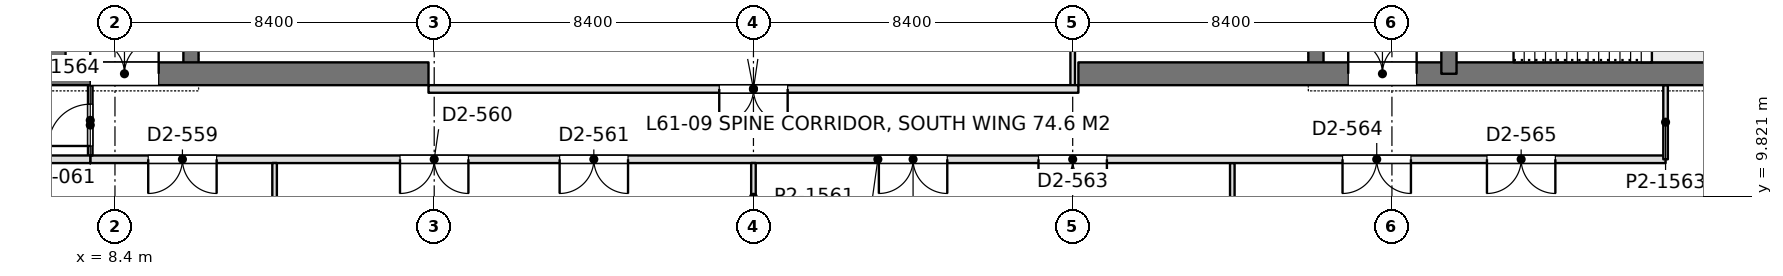
"""IFC4 building model, lengths in metres.
Left out: names, types, materials, properties, quantities, classifications, styles, units other than length and angle.
Written with IfcOpenShell. Run it as: python <this file> out.ifc"""

import sys

from ifc_helpers import new_model, si_unit, direction, frame, frame_2d, origin, place, context, subcontext, project, spatial, rectangle, extrude, element, fill, save


model = new_model("IFC4")
c1 = context("Model", 3, precision=1e-05, world=origin(), true_north=direction((0.0, 1.0)))
c2 = subcontext(c1, "Body", "Model", "MODEL_VIEW")
j1 = project(units=[si_unit("LENGTHUNIT", "METRE"), si_unit("PLANEANGLEUNIT", "RADIAN")], contexts=[c1])
p1 = place(None, origin())
s1 = spatial("IfcSite", under=j1, at=p1, CompositionType="ELEMENT")
p2 = place(p1, origin())
s2 = spatial("IfcBuilding", under=s1, at=p2, CompositionType="ELEMENT")
p3 = place(p2, frame((0.0, 0.0, 268.2)))
s3 = spatial("IfcBuildingStorey", under=s2, at=p3, CompositionType="ELEMENT", Elevation=268.2)
p4 = place(p3, frame((-1.05, 13.05, 0.0), z_axis=(0.0, 0.0, 1.0), x_axis=(1.0, 0.0, 0.0)))
e1 = element("IfcWall", 1, at=p4, inside=s3, PredefinedType="SHEAR", context=c2, shape_type="SweptSolid", body=[
    extrude(rectangle(XDim=17.7, YDim=0.6, at=frame_2d((8.85, 0.0))), origin(), (0.0, 0.0, 1.0), 4.5),
])
p5 = place(p4, frame((8.8, 0.0, 0.0)))
e2 = element("IfcOpeningElement", 2, at=p5, cuts=e1, PredefinedType="OPENING", context=c2, shape_type="SweptSolid", body=[
    extrude(rectangle(XDim=1.8, YDim=2.4, at=frame_2d((0.9, 1.2))), frame((0.0, 0.31, 0.0), z_axis=(0.0, -1.0, 0.0), x_axis=(1.0, 0.0, 0.0)), (0.0, 0.0, 1.0), 0.62),
])
p6 = place(p3, frame((6.9, 13.05, 0.0), z_axis=(0.0, 0.0, 1.0), x_axis=(0.0, 1.0, 0.0)))
e3 = element("IfcWall", 3, at=p6, inside=s3, PredefinedType="SHEAR", context=c2, shape_type="SweptSolid", body=[
    extrude(rectangle(XDim=24.3, YDim=0.4, at=frame_2d((12.15, 0.0))), origin(), (0.0, 0.0, 1.0), 4.5),
])
p7 = place(p6, frame((1.3, 0.0, 0.0)))
e4 = element("IfcOpeningElement", 4, at=p7, cuts=e3, PredefinedType="OPENING", context=c2, shape_type="SweptSolid", body=[
    extrude(rectangle(XDim=1.0, YDim=2.2, at=frame_2d((0.5, 1.1))), frame((0.0, 0.21, 0.0), z_axis=(0.0, -1.0, 0.0), x_axis=(1.0, 0.0, 0.0)), (0.0, 0.0, 1.0), 0.42),
])
p8 = place(p6, frame((22.0, 0.0, 0.0)))
e5 = element("IfcOpeningElement", 5, at=p8, cuts=e3, PredefinedType="OPENING", context=c2, shape_type="SweptSolid", body=[
    extrude(rectangle(XDim=1.0, YDim=2.2, at=frame_2d((0.5, 1.1))), frame((0.0, 0.21, 0.0), z_axis=(0.0, -1.0, 0.0), x_axis=(1.0, 0.0, 0.0)), (0.0, 0.0, 1.0), 0.42),
])
p9 = place(p6, frame((5.55, 0.0, 0.0)))
e6 = element("IfcOpeningElement", 6, at=p9, cuts=e3, PredefinedType="OPENING", context=c2, shape_type="SweptSolid", body=[
    extrude(rectangle(XDim=1.0, YDim=2.2, at=frame_2d((0.5, 1.1))), frame((0.0, 0.21, 0.0), z_axis=(0.0, -1.0, 0.0), x_axis=(1.0, 0.0, 0.0)), (0.0, 0.0, 1.0), 0.42),
])
p10 = place(p6, frame((9.55, 0.0, 0.0)))
e7 = element("IfcOpeningElement", 7, at=p10, cuts=e3, PredefinedType="OPENING", context=c2, shape_type="SweptSolid", body=[
    extrude(rectangle(XDim=1.0, YDim=2.2, at=frame_2d((0.5, 1.1))), frame((0.0, 0.21, 0.0), z_axis=(0.0, -1.0, 0.0), x_axis=(1.0, 0.0, 0.0)), (0.0, 0.0, 1.0), 0.42),
])
p11 = place(p6, frame((12.8, 0.0, 0.0)))
e8 = element("IfcOpeningElement", 8, at=p11, cuts=e3, PredefinedType="OPENING", context=c2, shape_type="SweptSolid", body=[
    extrude(rectangle(XDim=1.1, YDim=2.2, at=frame_2d((0.55, 1.1))), frame((0.0, 0.21, 0.0), z_axis=(0.0, -1.0, 0.0), x_axis=(1.0, 0.0, 0.0)), (0.0, 0.0, 1.0), 0.42),
])
p12 = place(p6, frame((15.538, 0.0, 0.0)))
e9 = element("IfcOpeningElement", 9, at=p12, cuts=e3, PredefinedType="OPENING", context=c2, shape_type="SweptSolid", body=[
    extrude(rectangle(XDim=1.1, YDim=2.2, at=frame_2d((0.55, 1.1))), frame((0.0, 0.21, 0.0), z_axis=(0.0, -1.0, 0.0), x_axis=(1.0, 0.0, 0.0)), (0.0, 0.0, 1.0), 0.42),
])
p13 = place(p6, frame((18.262, 0.0, 0.0)))
e10 = element("IfcOpeningElement", 10, at=p13, cuts=e3, PredefinedType="OPENING", context=c2, shape_type="SweptSolid", body=[
    extrude(rectangle(XDim=1.1, YDim=2.2, at=frame_2d((0.55, 1.1))), frame((0.0, 0.21, 0.0), z_axis=(0.0, -1.0, 0.0), x_axis=(1.0, 0.0, 0.0)), (0.0, 0.0, 1.0), 0.42),
])
p14 = place(p3, frame((10.4, 13.05, 0.0), z_axis=(0.0, 0.0, 1.0), x_axis=(0.0, 1.0, 0.0)))
e11 = element("IfcWall", 11, at=p14, inside=s3, PredefinedType="SHEAR", context=c2, shape_type="SweptSolid", body=[
    extrude(rectangle(XDim=24.3, YDim=0.4, at=frame_2d((12.15, 0.0))), origin(), (0.0, 0.0, 1.0), 4.5),
])
p15 = place(p14, frame((15.75, 0.0, 0.0)))
e12 = element("IfcOpeningElement", 12, at=p15, cuts=e11, PredefinedType="OPENING", context=c2, shape_type="SweptSolid", body=[
    extrude(rectangle(XDim=1.1, YDim=2.2, at=frame_2d((0.55, 1.1))), frame((0.0, 0.21, 0.0), z_axis=(0.0, -1.0, 0.0), x_axis=(1.0, 0.0, 0.0)), (0.0, 0.0, 1.0), 0.42),
])
p16 = place(p14, frame((18.6, 0.0, 0.0)))
e13 = element("IfcOpeningElement", 13, at=p16, cuts=e11, PredefinedType="OPENING", context=c2, shape_type="SweptSolid", body=[
    extrude(rectangle(XDim=1.1, YDim=2.2, at=frame_2d((0.55, 1.1))), frame((0.0, 0.21, 0.0), z_axis=(0.0, -1.0, 0.0), x_axis=(1.0, 0.0, 0.0)), (0.0, 0.0, 1.0), 0.42),
])
p17 = place(p14, frame((21.45, 0.0, 0.0)))
e14 = element("IfcOpeningElement", 14, at=p17, cuts=e11, PredefinedType="OPENING", context=c2, shape_type="SweptSolid", body=[
    extrude(rectangle(XDim=1.1, YDim=2.2, at=frame_2d((0.55, 1.1))), frame((0.0, 0.21, 0.0), z_axis=(0.0, -1.0, 0.0), x_axis=(1.0, 0.0, 0.0)), (0.0, 0.0, 1.0), 0.42),
])
p18 = place(p14, frame((8.65, 0.0, 0.0)))
e15 = element("IfcOpeningElement", 15, at=p18, cuts=e11, PredefinedType="OPENING", context=c2, shape_type="SweptSolid", body=[
    extrude(rectangle(XDim=1.8, YDim=2.4, at=frame_2d((0.9, 1.2))), frame((0.0, 0.21, 0.0), z_axis=(0.0, -1.0, 0.0), x_axis=(1.0, 0.0, 0.0)), (0.0, 0.0, 1.0), 0.42),
])
p19 = place(p3, frame((33.75, 13.05, 0.0), z_axis=(0.0, 0.0, 1.0), x_axis=(1.0, 0.0, 0.0)))
e16 = element("IfcWall", 16, at=p19, inside=s3, PredefinedType="SHEAR", context=c2, shape_type="SweptSolid", body=[
    extrude(rectangle(XDim=17.7, YDim=0.6, at=frame_2d((8.85, 0.0))), origin(), (0.0, 0.0, 1.0), 4.5),
])
p20 = place(p19, frame((7.1, 0.0, 0.0)))
e17 = element("IfcOpeningElement", 17, at=p20, cuts=e16, PredefinedType="OPENING", context=c2, shape_type="SweptSolid", body=[
    extrude(rectangle(XDim=1.8, YDim=2.4, at=frame_2d((0.9, 1.2))), frame((0.0, 0.31, 0.0), z_axis=(0.0, -1.0, 0.0), x_axis=(1.0, 0.0, 0.0)), (0.0, 0.0, 1.0), 0.62),
])
p21 = place(p3, frame((43.5, 13.05, 0.0), z_axis=(0.0, 0.0, 1.0), x_axis=(0.0, 1.0, 0.0)))
e18 = element("IfcWall", 18, at=p21, inside=s3, PredefinedType="SHEAR", context=c2, shape_type="SweptSolid", body=[
    extrude(rectangle(XDim=24.3, YDim=0.4, at=frame_2d((12.15, 0.0))), origin(), (0.0, 0.0, 1.0), 4.5),
])
p22 = place(p21, frame((1.3, 0.0, 0.0)))
e19 = element("IfcOpeningElement", 19, at=p22, cuts=e18, PredefinedType="OPENING", context=c2, shape_type="SweptSolid", body=[
    extrude(rectangle(XDim=1.0, YDim=2.2, at=frame_2d((0.5, 1.1))), frame((0.0, 0.21, 0.0), z_axis=(0.0, -1.0, 0.0), x_axis=(1.0, 0.0, 0.0)), (0.0, 0.0, 1.0), 0.42),
])
p23 = place(p21, frame((22.0, 0.0, 0.0)))
e20 = element("IfcOpeningElement", 20, at=p23, cuts=e18, PredefinedType="OPENING", context=c2, shape_type="SweptSolid", body=[
    extrude(rectangle(XDim=1.0, YDim=2.2, at=frame_2d((0.5, 1.1))), frame((0.0, 0.21, 0.0), z_axis=(0.0, -1.0, 0.0), x_axis=(1.0, 0.0, 0.0)), (0.0, 0.0, 1.0), 0.42),
])
p24 = place(p21, frame((5.55, 0.0, 0.0)))
e21 = element("IfcOpeningElement", 21, at=p24, cuts=e18, PredefinedType="OPENING", context=c2, shape_type="SweptSolid", body=[
    extrude(rectangle(XDim=1.0, YDim=2.2, at=frame_2d((0.5, 1.1))), frame((0.0, 0.21, 0.0), z_axis=(0.0, -1.0, 0.0), x_axis=(1.0, 0.0, 0.0)), (0.0, 0.0, 1.0), 0.42),
])
p25 = place(p21, frame((9.55, 0.0, 0.0)))
e22 = element("IfcOpeningElement", 22, at=p25, cuts=e18, PredefinedType="OPENING", context=c2, shape_type="SweptSolid", body=[
    extrude(rectangle(XDim=1.0, YDim=2.2, at=frame_2d((0.5, 1.1))), frame((0.0, 0.21, 0.0), z_axis=(0.0, -1.0, 0.0), x_axis=(1.0, 0.0, 0.0)), (0.0, 0.0, 1.0), 0.42),
])
p26 = place(p21, frame((12.8, 0.0, 0.0)))
e23 = element("IfcOpeningElement", 23, at=p26, cuts=e18, PredefinedType="OPENING", context=c2, shape_type="SweptSolid", body=[
    extrude(rectangle(XDim=1.1, YDim=2.2, at=frame_2d((0.55, 1.1))), frame((0.0, 0.21, 0.0), z_axis=(0.0, -1.0, 0.0), x_axis=(1.0, 0.0, 0.0)), (0.0, 0.0, 1.0), 0.42),
])
p27 = place(p21, frame((15.538, 0.0, 0.0)))
e24 = element("IfcOpeningElement", 24, at=p27, cuts=e18, PredefinedType="OPENING", context=c2, shape_type="SweptSolid", body=[
    extrude(rectangle(XDim=1.1, YDim=2.2, at=frame_2d((0.55, 1.1))), frame((0.0, 0.21, 0.0), z_axis=(0.0, -1.0, 0.0), x_axis=(1.0, 0.0, 0.0)), (0.0, 0.0, 1.0), 0.42),
])
p28 = place(p21, frame((18.262, 0.0, 0.0)))
e25 = element("IfcOpeningElement", 25, at=p28, cuts=e18, PredefinedType="OPENING", context=c2, shape_type="SweptSolid", body=[
    extrude(rectangle(XDim=1.1, YDim=2.2, at=frame_2d((0.55, 1.1))), frame((0.0, 0.21, 0.0), z_axis=(0.0, -1.0, 0.0), x_axis=(1.0, 0.0, 0.0)), (0.0, 0.0, 1.0), 0.42),
])
p29 = place(p3, frame((40.0, 13.05, 0.0), z_axis=(0.0, 0.0, 1.0), x_axis=(0.0, 1.0, 0.0)))
e26 = element("IfcWall", 26, at=p29, inside=s3, PredefinedType="SHEAR", context=c2, shape_type="SweptSolid", body=[
    extrude(rectangle(XDim=24.3, YDim=0.4, at=frame_2d((12.15, 0.0))), origin(), (0.0, 0.0, 1.0), 4.5),
])
p30 = place(p29, frame((15.75, 0.0, 0.0)))
e27 = element("IfcOpeningElement", 27, at=p30, cuts=e26, PredefinedType="OPENING", context=c2, shape_type="SweptSolid", body=[
    extrude(rectangle(XDim=1.1, YDim=2.2, at=frame_2d((0.55, 1.1))), frame((0.0, 0.21, 0.0), z_axis=(0.0, -1.0, 0.0), x_axis=(1.0, 0.0, 0.0)), (0.0, 0.0, 1.0), 0.42),
])
p31 = place(p29, frame((18.6, 0.0, 0.0)))
e28 = element("IfcOpeningElement", 28, at=p31, cuts=e26, PredefinedType="OPENING", context=c2, shape_type="SweptSolid", body=[
    extrude(rectangle(XDim=1.1, YDim=2.2, at=frame_2d((0.55, 1.1))), frame((0.0, 0.21, 0.0), z_axis=(0.0, -1.0, 0.0), x_axis=(1.0, 0.0, 0.0)), (0.0, 0.0, 1.0), 0.42),
])
p32 = place(p29, frame((21.45, 0.0, 0.0)))
e29 = element("IfcOpeningElement", 29, at=p32, cuts=e26, PredefinedType="OPENING", context=c2, shape_type="SweptSolid", body=[
    extrude(rectangle(XDim=1.1, YDim=2.2, at=frame_2d((0.55, 1.1))), frame((0.0, 0.21, 0.0), z_axis=(0.0, -1.0, 0.0), x_axis=(1.0, 0.0, 0.0)), (0.0, 0.0, 1.0), 0.42),
])
p33 = place(p29, frame((8.65, 0.0, 0.0)))
e30 = element("IfcOpeningElement", 30, at=p33, cuts=e26, PredefinedType="OPENING", context=c2, shape_type="SweptSolid", body=[
    extrude(rectangle(XDim=1.8, YDim=2.4, at=frame_2d((0.9, 1.2))), frame((0.0, 0.21, 0.0), z_axis=(0.0, -1.0, 0.0), x_axis=(1.0, 0.0, 0.0)), (0.0, 0.0, 1.0), 0.42),
])
p34 = place(p29, frame((1.5, 0.0, 0.0)))
e31 = element("IfcOpeningElement", 31, at=p34, cuts=e26, PredefinedType="OPENING", context=c2, shape_type="SweptSolid", body=[
    extrude(rectangle(XDim=1.8, YDim=2.4, at=frame_2d((0.9, 1.2))), frame((0.0, 0.21, 0.0), z_axis=(0.0, -1.0, 0.0), x_axis=(1.0, 0.0, 0.0)), (0.0, 0.0, 1.0), 0.42),
])
p35 = place(p3, frame((33.6, 12.6, 0.0), z_axis=(0.0, 0.0, 1.0), x_axis=(0.0, 1.0, 0.0)))
e32 = element("IfcWall", 32, at=p35, inside=s3, PredefinedType="PARTITIONING", context=c2, shape_type="SweptSolid", body=[
    extrude(rectangle(XDim=4.502, YDim=0.12, at=frame_2d((2.251, 0.0))), origin(), (0.0, 0.0, 1.0), 3.66),
])
p36 = place(p3, frame((12.6, 7.598, 0.0), z_axis=(0.0, 0.0, 1.0), x_axis=(0.0, 1.0, 0.0)))
e33 = element("IfcWall", 33, at=p36, inside=s3, PredefinedType="PARTITIONING", context=c2, shape_type="SweptSolid", body=[
    extrude(rectangle(XDim=3.104, YDim=0.12, at=frame_2d((1.552, 0.0))), origin(), (0.0, 0.0, 1.0), 3.8),
])
p37 = place(p3, frame((25.2, 8.899, 0.0), z_axis=(0.0, 0.0, 1.0), x_axis=(0.0, 1.0, 0.0)))
e34 = element("IfcWall", 34, at=p37, inside=s3, PredefinedType="PARTITIONING", context=c2, shape_type="SweptSolid", body=[
    extrude(rectangle(XDim=1.803, YDim=0.12, at=frame_2d((0.901, 0.0))), origin(), (0.0, 0.0, 1.0), 3.8),
])
p38 = place(p3, frame((37.8, 7.598, 0.0), z_axis=(0.0, 0.0, 1.0), x_axis=(0.0, 1.0, 0.0)))
e35 = element("IfcWall", 35, at=p38, inside=s3, PredefinedType="PARTITIONING", context=c2, shape_type="SweptSolid", body=[
    extrude(rectangle(XDim=3.104, YDim=0.12, at=frame_2d((1.552, 0.0))), origin(), (0.0, 0.0, 1.0), 3.8),
])
p39 = place(p3, frame((7.748, 10.8, 0.0), z_axis=(0.0, 0.0, 1.0), x_axis=(1.0, 0.0, 0.0)))
e36 = element("IfcWall", 36, at=p39, inside=s3, PredefinedType="PARTITIONING", context=c2, shape_type="SweptSolid", body=[
    extrude(rectangle(XDim=41.452, YDim=0.2, at=frame_2d((20.726, 0.0))), origin(), (0.0, 0.0, 1.0), 3.8),
])
p40 = place(p39, frame((1.527, 0.0, 0.0)))
e37 = element("IfcOpeningElement", 37, at=p40, cuts=e36, PredefinedType="OPENING", context=c2, shape_type="SweptSolid", body=[
    extrude(rectangle(XDim=1.8, YDim=2.2, at=frame_2d((0.9, 1.1))), frame((0.0, 0.11, 0.0), z_axis=(0.0, -1.0, 0.0), x_axis=(1.0, 0.0, 0.0)), (0.0, 0.0, 1.0), 0.22),
])
p41 = place(p39, frame((8.152, 0.0, 0.0)))
e38 = element("IfcOpeningElement", 38, at=p41, cuts=e36, PredefinedType="OPENING", context=c2, shape_type="SweptSolid", body=[
    extrude(rectangle(XDim=1.8, YDim=2.2, at=frame_2d((0.9, 1.1))), frame((0.0, 0.11, 0.0), z_axis=(0.0, -1.0, 0.0), x_axis=(1.0, 0.0, 0.0)), (0.0, 0.0, 1.0), 0.22),
])
p42 = place(p39, frame((12.352, 0.0, 0.0)))
e39 = element("IfcOpeningElement", 39, at=p42, cuts=e36, PredefinedType="OPENING", context=c2, shape_type="SweptSolid", body=[
    extrude(rectangle(XDim=1.8, YDim=2.2, at=frame_2d((0.9, 1.1))), frame((0.0, 0.11, 0.0), z_axis=(0.0, -1.0, 0.0), x_axis=(1.0, 0.0, 0.0)), (0.0, 0.0, 1.0), 0.22),
])
p43 = place(p39, frame((20.752, 0.0, 0.0)))
e40 = element("IfcOpeningElement", 40, at=p43, cuts=e36, PredefinedType="OPENING", context=c2, shape_type="SweptSolid", body=[
    extrude(rectangle(XDim=1.8, YDim=2.2, at=frame_2d((0.9, 1.1))), frame((0.0, 0.11, 0.0), z_axis=(0.0, -1.0, 0.0), x_axis=(1.0, 0.0, 0.0)), (0.0, 0.0, 1.0), 0.22),
])
p44 = place(p39, frame((24.952, 0.0, 0.0)))
e41 = element("IfcOpeningElement", 41, at=p44, cuts=e36, PredefinedType="OPENING", context=c2, shape_type="SweptSolid", body=[
    extrude(rectangle(XDim=1.8, YDim=2.2, at=frame_2d((0.9, 1.1))), frame((0.0, 0.11, 0.0), z_axis=(0.0, -1.0, 0.0), x_axis=(1.0, 0.0, 0.0)), (0.0, 0.0, 1.0), 0.22),
])
p45 = place(p39, frame((32.952, 0.0, 0.0)))
e42 = element("IfcOpeningElement", 42, at=p45, cuts=e36, PredefinedType="OPENING", context=c2, shape_type="SweptSolid", body=[
    extrude(rectangle(XDim=1.8, YDim=2.2, at=frame_2d((0.9, 1.1))), frame((0.0, 0.11, 0.0), z_axis=(0.0, -1.0, 0.0), x_axis=(1.0, 0.0, 0.0)), (0.0, 0.0, 1.0), 0.22),
])
p46 = place(p39, frame((36.752, 0.0, 0.0)))
e43 = element("IfcOpeningElement", 43, at=p46, cuts=e36, PredefinedType="OPENING", context=c2, shape_type="SweptSolid", body=[
    extrude(rectangle(XDim=1.8, YDim=2.2, at=frame_2d((0.9, 1.1))), frame((0.0, 0.11, 0.0), z_axis=(0.0, -1.0, 0.0), x_axis=(1.0, 0.0, 0.0)), (0.0, 0.0, 1.0), 0.22),
])
p47 = place(p3, frame((7.75, 10.898, 0.0), z_axis=(0.0, 0.0, 1.0), x_axis=(0.0, 1.0, 0.0)))
e44 = element("IfcWall", 44, at=p47, inside=s3, PredefinedType="PARTITIONING", context=c2, shape_type="SweptSolid", body=[
    extrude(rectangle(XDim=1.854, YDim=0.12, at=frame_2d((0.927, 0.0))), origin(), (0.0, 0.0, 1.0), 4.35),
])
p48 = place(p47, frame((0.252, 0.0, 0.0)))
e45 = element("IfcOpeningElement", 45, at=p48, cuts=e44, PredefinedType="OPENING", context=c2, shape_type="SweptSolid", body=[
    extrude(rectangle(XDim=1.1, YDim=2.4, at=frame_2d((0.55, 1.2))), frame((0.0, 0.07, 0.0), z_axis=(0.0, -1.0, 0.0), x_axis=(1.0, 0.0, 0.0)), (0.0, 0.0, 1.0), 0.14),
])
p49 = place(p3, frame((49.2, 10.8, 0.0), z_axis=(0.0, 0.0, 1.0), x_axis=(0.0, 1.0, 0.0)))
e46 = element("IfcWall", 46, at=p49, inside=s3, PredefinedType="PARTITIONING", context=c2, shape_type="SweptSolid", body=[
    extrude(rectangle(XDim=1.952, YDim=0.12, at=frame_2d((0.976, 0.0))), origin(), (0.0, 0.0, 1.0), 4.35),
])
p50 = place(p3, frame((1.2, 10.8, 0.0), z_axis=(0.0, 0.0, 1.0), x_axis=(1.0, 0.0, 0.0)))
e47 = element("IfcWall", 47, at=p50, inside=s3, PredefinedType="PARTITIONING", context=c2, shape_type="SweptSolid", body=[
    extrude(rectangle(XDim=6.552, YDim=0.2, at=frame_2d((3.276, 0.0))), origin(), (0.0, 0.0, 1.0), 4.35),
])
p51 = place(p3, frame((16.65, 12.65, 0.0), z_axis=(0.0, 0.0, 1.0), x_axis=(1.0, 0.0, 0.0)))
e48 = element("IfcWall", 48, at=p51, inside=s3, PredefinedType="PARTITIONING", context=c2, shape_type="SweptSolid", body=[
    extrude(rectangle(XDim=17.1, YDim=0.2, at=frame_2d((8.55, 0.0))), origin(), (0.0, 0.0, 1.0), 3.8),
])
p52 = place(p51, frame((7.65, 0.0, 0.0)))
e49 = element("IfcOpeningElement", 49, at=p52, cuts=e48, PredefinedType="OPENING", context=c2, shape_type="SweptSolid", body=[
    extrude(rectangle(XDim=1.8, YDim=2.2, at=frame_2d((0.9, 1.1))), frame((0.0, 0.11, 0.0), z_axis=(0.0, -1.0, 0.0), x_axis=(1.0, 0.0, 0.0)), (0.0, 0.0, 1.0), 0.22),
])
p53 = place(p5, origin())
e50 = element("IfcDoor", 50, at=p53, inside=s3, OperationType="DOUBLE_DOOR_SINGLE_SWING", PredefinedType="DOOR", context=c2, shape_type="SweptSolid", body=[
    extrude(rectangle(XDim=1.8, YDim=2.4, at=frame_2d((0.9, 1.2))), frame((0.0, 0.025, 0.0), z_axis=(0.0, -1.0, 0.0), x_axis=(1.0, 0.0, 0.0)), (0.0, 0.0, 1.0), 0.05),
])
fill(e2, e50)
p54 = place(p20, origin())
e51 = element("IfcDoor", 51, at=p54, inside=s3, OperationType="DOUBLE_DOOR_SINGLE_SWING", PredefinedType="DOOR", context=c2, shape_type="SweptSolid", body=[
    extrude(rectangle(XDim=1.8, YDim=2.4, at=frame_2d((0.9, 1.2))), frame((0.0, 0.025, 0.0), z_axis=(0.0, -1.0, 0.0), x_axis=(1.0, 0.0, 0.0)), (0.0, 0.0, 1.0), 0.05),
])
fill(e17, e51)
p55 = place(p40, frame((1.8, 0.0, 0.0), z_axis=(0.0, 0.0, 1.0), x_axis=(-1.0, 0.0, 0.0)))
e52 = element("IfcDoor", 52, at=p55, inside=s3, OperationType="DOUBLE_DOOR_SINGLE_SWING", PredefinedType="DOOR", context=c2, shape_type="SweptSolid", body=[
    extrude(rectangle(XDim=1.8, YDim=2.2, at=frame_2d((0.9, 1.1))), frame((0.0, 0.025, 0.0), z_axis=(0.0, -1.0, 0.0), x_axis=(1.0, 0.0, 0.0)), (0.0, 0.0, 1.0), 0.05),
])
fill(e37, e52)
p56 = place(p41, frame((1.8, 0.0, 0.0), z_axis=(0.0, 0.0, 1.0), x_axis=(-1.0, 0.0, 0.0)))
e53 = element("IfcDoor", 53, at=p56, inside=s3, OperationType="DOUBLE_DOOR_SINGLE_SWING", PredefinedType="DOOR", context=c2, shape_type="SweptSolid", body=[
    extrude(rectangle(XDim=1.8, YDim=2.2, at=frame_2d((0.9, 1.1))), frame((0.0, 0.025, 0.0), z_axis=(0.0, -1.0, 0.0), x_axis=(1.0, 0.0, 0.0)), (0.0, 0.0, 1.0), 0.05),
])
fill(e38, e53)
p57 = place(p42, frame((1.8, 0.0, 0.0), z_axis=(0.0, 0.0, 1.0), x_axis=(-1.0, 0.0, 0.0)))
e54 = element("IfcDoor", 54, at=p57, inside=s3, OperationType="DOUBLE_DOOR_SINGLE_SWING", PredefinedType="DOOR", context=c2, shape_type="SweptSolid", body=[
    extrude(rectangle(XDim=1.8, YDim=2.2, at=frame_2d((0.9, 1.1))), frame((0.0, 0.025, 0.0), z_axis=(0.0, -1.0, 0.0), x_axis=(1.0, 0.0, 0.0)), (0.0, 0.0, 1.0), 0.05),
])
fill(e39, e54)
p58 = place(p43, frame((1.8, 0.0, 0.0), z_axis=(0.0, 0.0, 1.0), x_axis=(-1.0, 0.0, 0.0)))
e55 = element("IfcDoor", 55, at=p58, inside=s3, OperationType="DOUBLE_DOOR_SINGLE_SWING", PredefinedType="DOOR", context=c2, shape_type="SweptSolid", body=[
    extrude(rectangle(XDim=1.8, YDim=2.2, at=frame_2d((0.9, 1.1))), frame((0.0, 0.025, 0.0), z_axis=(0.0, -1.0, 0.0), x_axis=(1.0, 0.0, 0.0)), (0.0, 0.0, 1.0), 0.05),
])
fill(e40, e55)
p59 = place(p44, frame((1.8, 0.0, 0.0), z_axis=(0.0, 0.0, 1.0), x_axis=(-1.0, 0.0, 0.0)))
e56 = element("IfcDoor", 56, at=p59, inside=s3, OperationType="DOUBLE_DOOR_SINGLE_SWING", PredefinedType="DOOR", context=c2, shape_type="SweptSolid", body=[
    extrude(rectangle(XDim=1.8, YDim=2.2, at=frame_2d((0.9, 1.1))), frame((0.0, 0.025, 0.0), z_axis=(0.0, -1.0, 0.0), x_axis=(1.0, 0.0, 0.0)), (0.0, 0.0, 1.0), 0.05),
])
fill(e41, e56)
p60 = place(p45, frame((1.8, 0.0, 0.0), z_axis=(0.0, 0.0, 1.0), x_axis=(-1.0, 0.0, 0.0)))
e57 = element("IfcDoor", 57, at=p60, inside=s3, OperationType="DOUBLE_DOOR_SINGLE_SWING", PredefinedType="DOOR", context=c2, shape_type="SweptSolid", body=[
    extrude(rectangle(XDim=1.8, YDim=2.2, at=frame_2d((0.9, 1.1))), frame((0.0, 0.025, 0.0), z_axis=(0.0, -1.0, 0.0), x_axis=(1.0, 0.0, 0.0)), (0.0, 0.0, 1.0), 0.05),
])
fill(e42, e57)
p61 = place(p46, frame((1.8, 0.0, 0.0), z_axis=(0.0, 0.0, 1.0), x_axis=(-1.0, 0.0, 0.0)))
e58 = element("IfcDoor", 58, at=p61, inside=s3, OperationType="DOUBLE_DOOR_SINGLE_SWING", PredefinedType="DOOR", context=c2, shape_type="SweptSolid", body=[
    extrude(rectangle(XDim=1.8, YDim=2.2, at=frame_2d((0.9, 1.1))), frame((0.0, 0.025, 0.0), z_axis=(0.0, -1.0, 0.0), x_axis=(1.0, 0.0, 0.0)), (0.0, 0.0, 1.0), 0.05),
])
fill(e43, e58)
p62 = place(p48, origin())
e59 = element("IfcDoor", 59, at=p62, inside=s3, OperationType="SINGLE_SWING_LEFT", PredefinedType="DOOR", context=c2, shape_type="SweptSolid", body=[
    extrude(rectangle(XDim=1.1, YDim=2.4, at=frame_2d((0.55, 1.2))), frame((0.0, 0.025, 0.0), z_axis=(0.0, -1.0, 0.0), x_axis=(1.0, 0.0, 0.0)), (0.0, 0.0, 1.0), 0.05),
])
fill(e45, e59)
p63 = place(p52, frame((1.8, 0.0, 0.0), z_axis=(0.0, 0.0, 1.0), x_axis=(-1.0, 0.0, 0.0)))
e60 = element("IfcDoor", 60, at=p63, inside=s3, OperationType="DOUBLE_DOOR_SINGLE_SWING", PredefinedType="DOOR", context=c2, shape_type="SweptSolid", body=[
    extrude(rectangle(XDim=1.8, YDim=2.2, at=frame_2d((0.9, 1.1))), frame((0.0, 0.025, 0.0), z_axis=(0.0, -1.0, 0.0), x_axis=(1.0, 0.0, 0.0)), (0.0, 0.0, 1.0), 0.05),
])
fill(e49, e60)
save(model, sys.argv[1])
